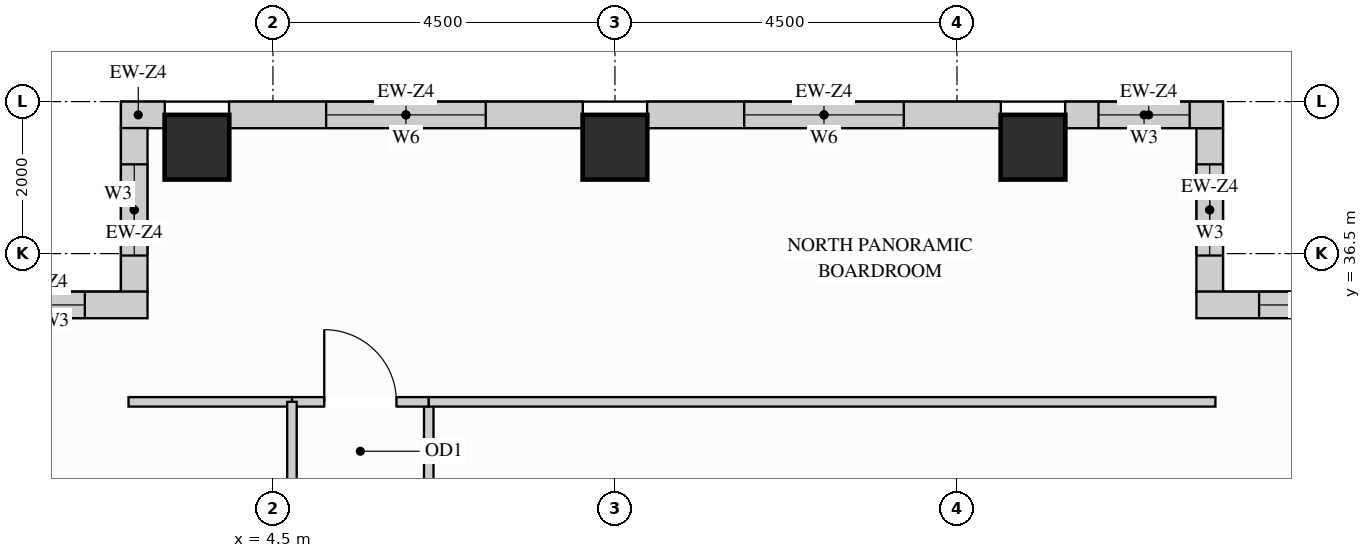
"""IFC4 building model, lengths in metres.
Left out: names, types, materials, properties, quantities, classifications, styles, units other than length and angle.
Written with IfcOpenShell. Run it as: python <this file> out.ifc"""

import sys

from ifc_helpers import new_model, si_unit, direction, frame, frame_2d, origin, origin_2d, place, context, subcontext, project, spatial, rectangle, extrude, source, transform, mapped, element, fill, save


model = new_model("IFC4")
c1 = context("Model", 3, precision=1e-05, world=origin(), true_north=direction((0.0, 1.0)))
c2 = subcontext(c1, "Body", "Model", "MODEL_VIEW")
j1 = project(units=[si_unit("LENGTHUNIT", "METRE"), si_unit("PLANEANGLEUNIT", "RADIAN")], contexts=[c1])
p1 = place(None, origin())
s1 = spatial("IfcSite", under=j1, at=p1, CompositionType="ELEMENT")
p2 = place(p1, origin())
s2 = spatial("IfcBuilding", under=s1, at=p2, CompositionType="ELEMENT")
p3 = place(p2, frame((0.0, 0.0, 270.0)))
s3 = spatial("IfcBuildingStorey", under=s2, at=p3, CompositionType="ELEMENT", Elevation=270.0)
m1 = source(origin(), c2, "Body", "SweptSolid", [
    extrude(rectangle(XDim=0.85, YDim=0.85, at=origin_2d()), origin(), (0.0, 0.0, 1.0), 3.4),
])
for number, where, z_axis, x_axis in (
    (1, (14.5, 37.9, 0.0), (0.0, 0.0, 1.0), (1.0, 0.0, 0.0)),
    (2, (3.5, 37.9, 0.0), (0.0, 0.0, 1.0), (1.0, 0.0, 0.0)),
    (3, (9.0, 37.9, 0.0), (0.0, 0.0, 1.0), (1.0, 0.0, 0.0)),
):
    element("IfcColumn", number, at=place(p3, frame(where, z_axis=z_axis, x_axis=x_axis)), inside=s3, PredefinedType="COLUMN", context=c2, shape_type="MappedRepresentation", body=[
        mapped(m1, transform((0.0, 0.0, 0.0), x_axis=(1.0, 0.0, 0.0), y_axis=(0.0, 1.0, 0.0), z_axis=(0.0, 0.0, 1.0))),
    ])
p4 = place(p3, frame((16.825, 35.998, 0.0), z_axis=(0.0, 0.0, 1.0), x_axis=(0.0, 1.0, 0.0)))
e4 = element("IfcWall", 4, at=p4, inside=s3, PredefinedType="SOLIDWALL", context=c2, shape_type="SweptSolid", body=[
    extrude(rectangle(XDim=2.154, YDim=0.35, at=frame_2d((1.077, 0.0))), origin(), (0.0, 0.0, 1.0), 3.385),
])
p5 = place(p4, frame((0.477, 0.0, 0.78)))
e5 = element("IfcOpeningElement", 5, at=p5, cuts=e4, PredefinedType="OPENING", context=c2, shape_type="SweptSolid", body=[
    extrude(rectangle(XDim=1.2, YDim=2.25, at=frame_2d((0.6, 1.125))), frame((0.0, 0.185, 0.0), z_axis=(0.0, -1.0, 0.0), x_axis=(1.0, 0.0, 0.0)), (0.0, 0.0, 1.0), 0.37),
])
p6 = place(p3, frame((17.0, 38.325, 0.0), z_axis=(0.0, 0.0, 1.0), x_axis=(-1.0, 0.0, 0.0)))
e6 = element("IfcWall", 6, at=p6, inside=s3, PredefinedType="SOLIDWALL", context=c2, shape_type="SweptSolid", body=[
    extrude(rectangle(XDim=2.077, YDim=0.35, at=frame_2d((1.039, 0.0))), origin(), (0.0, 0.0, 1.0), 3.385),
])
p7 = place(p6, frame((0.438, 0.0, 0.78)))
e7 = element("IfcOpeningElement", 7, at=p7, cuts=e6, PredefinedType="OPENING", context=c2, shape_type="SweptSolid", body=[
    extrude(rectangle(XDim=1.2, YDim=2.25, at=frame_2d((0.6, 1.125))), frame((0.0, 0.185, 0.0), z_axis=(0.0, -1.0, 0.0), x_axis=(1.0, 0.0, 0.0)), (0.0, 0.0, 1.0), 0.37),
])
p8 = place(p3, frame((14.077, 38.325, 0.0), z_axis=(0.0, 0.0, 1.0), x_axis=(-1.0, 0.0, 0.0)))
e8 = element("IfcWall", 8, at=p8, inside=s3, PredefinedType="SOLIDWALL", context=c2, shape_type="SweptSolid", body=[
    extrude(rectangle(XDim=4.654, YDim=0.35, at=frame_2d((2.327, 0.0))), origin(), (0.0, 0.0, 1.0), 3.385),
])
p9 = place(p8, frame((1.277, 0.0, 0.78)))
e9 = element("IfcOpeningElement", 9, at=p9, cuts=e8, PredefinedType="OPENING", context=c2, shape_type="SweptSolid", body=[
    extrude(rectangle(XDim=2.1, YDim=2.25, at=frame_2d((1.05, 1.125))), frame((0.0, 0.185, 0.0), z_axis=(0.0, -1.0, 0.0), x_axis=(1.0, 0.0, 0.0)), (0.0, 0.0, 1.0), 0.37),
])
p10 = place(p3, frame((8.577, 38.325, 0.0), z_axis=(0.0, 0.0, 1.0), x_axis=(-1.0, 0.0, 0.0)))
e10 = element("IfcWall", 10, at=p10, inside=s3, PredefinedType="SOLIDWALL", context=c2, shape_type="SweptSolid", body=[
    extrude(rectangle(XDim=4.654, YDim=0.35, at=frame_2d((2.327, 0.0))), origin(), (0.0, 0.0, 1.0), 3.385),
])
p11 = place(p10, frame((1.277, 0.0, 0.78)))
e11 = element("IfcOpeningElement", 11, at=p11, cuts=e10, PredefinedType="OPENING", context=c2, shape_type="SweptSolid", body=[
    extrude(rectangle(XDim=2.1, YDim=2.25, at=frame_2d((1.05, 1.125))), frame((0.0, 0.185, 0.0), z_axis=(0.0, -1.0, 0.0), x_axis=(1.0, 0.0, 0.0)), (0.0, 0.0, 1.0), 0.37),
])
m2 = source(origin(), c2, "Body", "SweptSolid", [
    extrude(rectangle(XDim=0.577, YDim=0.35, at=frame_2d((0.289, 0.0))), origin(), (0.0, 0.0, 1.0), 3.385),
])
p12 = place(p3, frame((3.077, 38.325, 0.0), z_axis=(0.0, 0.0, 1.0), x_axis=(-1.0, 0.0, 0.0)))
e12 = element("IfcWall", 12, at=p12, inside=s3, PredefinedType="SOLIDWALL", context=c2, shape_type="MappedRepresentation", body=[
    mapped(m2, transform((0.0, 0.0, 0.0), x_axis=(1.0, 0.0, 0.0), y_axis=(0.0, 1.0, 0.0), z_axis=(0.0, 0.0, 1.0))),
])
p13 = place(p3, frame((2.675, 38.152, 0.0), z_axis=(0.0, 0.0, 1.0), x_axis=(0.0, -1.0, 0.0)))
e13 = element("IfcWall", 13, at=p13, inside=s3, PredefinedType="SOLIDWALL", context=c2, shape_type="SweptSolid", body=[
    extrude(rectangle(XDim=2.154, YDim=0.35, at=frame_2d((1.077, 0.0))), origin(), (0.0, 0.0, 1.0), 3.385),
])
p14 = place(p13, frame((0.477, 0.0, 0.78)))
e14 = element("IfcOpeningElement", 14, at=p14, cuts=e13, PredefinedType="OPENING", context=c2, shape_type="SweptSolid", body=[
    extrude(rectangle(XDim=1.2, YDim=2.25, at=frame_2d((0.6, 1.125))), frame((0.0, 0.185, 0.0), z_axis=(0.0, -1.0, 0.0), x_axis=(1.0, 0.0, 0.0)), (0.0, 0.0, 1.0), 0.37),
])
p15 = place(p3, frame((2.85, 35.825, 0.0), z_axis=(0.0, 0.0, 1.0), x_axis=(-1.0, 0.0, 0.0)))
e15 = element("IfcWall", 15, at=p15, inside=s3, PredefinedType="SOLIDWALL", context=c2, shape_type="SweptSolid", body=[
    extrude(rectangle(XDim=2.85, YDim=0.35, at=frame_2d((1.425, 0.0))), origin(), (0.0, 0.0, 1.0), 3.385),
])
p16 = place(p15, frame((0.825, 0.0, 0.78)))
e16 = element("IfcOpeningElement", 16, at=p16, cuts=e15, PredefinedType="OPENING", context=c2, shape_type="SweptSolid", body=[
    extrude(rectangle(XDim=1.2, YDim=2.25, at=frame_2d((0.6, 1.125))), frame((0.0, 0.185, 0.0), z_axis=(0.0, -1.0, 0.0), x_axis=(1.0, 0.0, 0.0)), (0.0, 0.0, 1.0), 0.37),
])
p17 = place(p3, frame((19.5, 35.825, 0.0), z_axis=(0.0, 0.0, 1.0), x_axis=(-1.0, 0.0, 0.0)))
e17 = element("IfcWall", 17, at=p17, inside=s3, PredefinedType="SOLIDWALL", context=c2, shape_type="SweptSolid", body=[
    extrude(rectangle(XDim=2.85, YDim=0.35, at=frame_2d((1.425, 0.0))), origin(), (0.0, 0.0, 1.0), 3.385),
])
p18 = place(p17, frame((0.825, 0.0, 0.78)))
e18 = element("IfcOpeningElement", 18, at=p18, cuts=e17, PredefinedType="OPENING", context=c2, shape_type="SweptSolid", body=[
    extrude(rectangle(XDim=1.2, YDim=2.25, at=frame_2d((0.6, 1.125))), frame((0.0, 0.185, 0.0), z_axis=(0.0, -1.0, 0.0), x_axis=(1.0, 0.0, 0.0)), (0.0, 0.0, 1.0), 0.37),
])
p19 = place(p3, frame((6.55, 31.45, 0.0), z_axis=(0.0, 0.0, 1.0), x_axis=(0.0, 1.0, 0.0)))
e19 = element("IfcWall", 19, at=p19, inside=s3, PredefinedType="PARTITIONING", context=c2, shape_type="SweptSolid", body=[
    extrude(rectangle(XDim=3.1, YDim=0.125, at=frame_2d((1.55, 0.0))), origin(), (0.0, 0.0, 1.0), 3.385),
])
p20 = place(p19, frame((1.075, 0.0, 0.0)))
e20 = element("IfcOpeningElement", 20, at=p20, cuts=e19, PredefinedType="OPENING", context=c2, shape_type="SweptSolid", body=[
    extrude(rectangle(XDim=0.95, YDim=2.15, at=frame_2d((0.475, 1.075))), frame((0.0, 0.073, 0.0), z_axis=(0.0, -1.0, 0.0), x_axis=(1.0, 0.0, 0.0)), (0.0, 0.0, 1.0), 0.145),
])
p21 = place(p3, frame((4.75, 34.55, 0.0), z_axis=(0.0, 0.0, 1.0), x_axis=(1.0, 0.0, 0.0)))
e21 = element("IfcWall", 21, at=p21, inside=s3, PredefinedType="PARTITIONING", context=c2, shape_type="SweptSolid", body=[
    extrude(rectangle(XDim=1.8, YDim=0.125, at=frame_2d((0.9, 0.0))), origin(), (0.0, 0.0, 1.0), 3.385),
])
p22 = place(p21, frame((0.425, 0.0, 0.0)))
e22 = element("IfcOpeningElement", 22, at=p22, cuts=e21, PredefinedType="OPENING", context=c2, shape_type="SweptSolid", body=[
    extrude(rectangle(XDim=0.95, YDim=2.15, at=frame_2d((0.475, 1.075))), frame((0.0, 0.073, 0.0), z_axis=(0.0, -1.0, 0.0), x_axis=(1.0, 0.0, 0.0)), (0.0, 0.0, 1.0), 0.145),
])
m3 = source(origin(), c2, "Body", "SweptSolid", [
    extrude(rectangle(XDim=10.35, YDim=0.125, at=frame_2d((5.175, 0.0))), origin(), (0.0, 0.0, 1.0), 3.385),
])
p23 = place(p3, frame((6.55, 34.55, 0.0), z_axis=(0.0, 0.0, 1.0), x_axis=(1.0, 0.0, 0.0)))
e23 = element("IfcWall", 23, at=p23, inside=s3, PredefinedType="PARTITIONING", context=c2, shape_type="MappedRepresentation", body=[
    mapped(m3, transform((0.0, 0.0, 0.0), x_axis=(1.0, 0.0, 0.0), y_axis=(0.0, 1.0, 0.0), z_axis=(0.0, 0.0, 1.0))),
])
m4 = source(origin(), c2, "Body", "SweptSolid", [
    extrude(rectangle(XDim=2.15, YDim=0.125, at=frame_2d((1.075, 0.0))), origin(), (0.0, 0.0, 1.0), 3.385),
])
p24 = place(p3, frame((2.6, 34.55, 0.0), z_axis=(0.0, 0.0, 1.0), x_axis=(1.0, 0.0, 0.0)))
e24 = element("IfcWall", 24, at=p24, inside=s3, PredefinedType="PARTITIONING", context=c2, shape_type="MappedRepresentation", body=[
    mapped(m4, transform((0.0, 0.0, 0.0), x_axis=(1.0, 0.0, 0.0), y_axis=(0.0, 1.0, 0.0), z_axis=(0.0, 0.0, 1.0))),
])
p25 = place(p3, frame((4.75, 31.45, 0.0), z_axis=(0.0, 0.0, 1.0), x_axis=(0.0, 1.0, 0.0)))
e25 = element("IfcWall", 25, at=p25, inside=s3, PredefinedType="PARTITIONING", context=c2, shape_type="SweptSolid", body=[
    extrude(rectangle(XDim=3.1, YDim=0.125, at=frame_2d((1.55, 0.0))), origin(), (0.0, 0.0, 1.0), 3.385),
])
p26 = place(p25, frame((1.075, 0.0, 0.0)))
e26 = element("IfcOpeningElement", 26, at=p26, cuts=e25, PredefinedType="OPENING", context=c2, shape_type="SweptSolid", body=[
    extrude(rectangle(XDim=0.95, YDim=2.15, at=frame_2d((0.475, 1.075))), frame((0.0, 0.073, 0.0), z_axis=(0.0, -1.0, 0.0), x_axis=(1.0, 0.0, 0.0)), (0.0, 0.0, 1.0), 0.145),
])
m5 = source(origin(), c2, "Body", "SweptSolid", [
    extrude(rectangle(XDim=0.95, YDim=2.15, at=frame_2d((0.475, 1.075))), frame((0.0, 0.025, 0.0), z_axis=(0.0, -1.0, 0.0), x_axis=(1.0, 0.0, 0.0)), (0.0, 0.0, 1.0), 0.05),
])
p27 = place(p22, origin())
e27 = element("IfcDoor", 27, at=p27, inside=s3, OperationType="SINGLE_SWING_LEFT", PredefinedType="DOOR", context=c2, shape_type="MappedRepresentation", body=[
    mapped(m5, transform((0.0, 0.0, 0.0), x_axis=(1.0, 0.0, 0.0), y_axis=(0.0, 1.0, 0.0), z_axis=(0.0, 0.0, 1.0))),
])
fill(e22, e27)
m6 = source(origin(), c2, "Body", "SweptSolid", [
    extrude(rectangle(XDim=1.2, YDim=2.25, at=frame_2d((0.6, 1.125))), frame((0.0, 0.03, 0.0), z_axis=(0.0, -1.0, 0.0), x_axis=(1.0, 0.0, 0.0)), (0.0, 0.0, 1.0), 0.06),
])
p28 = place(p5, origin())
e28 = element("IfcWindow", 28, at=p28, inside=s3, PartitioningType="SINGLE_PANEL", PredefinedType="WINDOW", context=c2, shape_type="MappedRepresentation", body=[
    mapped(m6, transform((0.0, 0.0, 0.0), x_axis=(1.0, 0.0, 0.0), y_axis=(0.0, 1.0, 0.0), z_axis=(0.0, 0.0, 1.0))),
])
fill(e5, e28)
p29 = place(p7, origin())
e29 = element("IfcWindow", 29, at=p29, inside=s3, PartitioningType="SINGLE_PANEL", PredefinedType="WINDOW", context=c2, shape_type="MappedRepresentation", body=[
    mapped(m6, transform((0.0, 0.0, 0.0), x_axis=(1.0, 0.0, 0.0), y_axis=(0.0, 1.0, 0.0), z_axis=(0.0, 0.0, 1.0))),
])
fill(e7, e29)
p30 = place(p14, origin())
e30 = element("IfcWindow", 30, at=p30, inside=s3, PartitioningType="SINGLE_PANEL", PredefinedType="WINDOW", context=c2, shape_type="MappedRepresentation", body=[
    mapped(m6, transform((0.0, 0.0, 0.0), x_axis=(1.0, 0.0, 0.0), y_axis=(0.0, 1.0, 0.0), z_axis=(0.0, 0.0, 1.0))),
])
fill(e14, e30)
p31 = place(p16, origin())
e31 = element("IfcWindow", 31, at=p31, inside=s3, PartitioningType="SINGLE_PANEL", PredefinedType="WINDOW", context=c2, shape_type="MappedRepresentation", body=[
    mapped(m6, transform((0.0, 0.0, 0.0), x_axis=(1.0, 0.0, 0.0), y_axis=(0.0, 1.0, 0.0), z_axis=(0.0, 0.0, 1.0))),
])
fill(e16, e31)
p32 = place(p18, origin())
e32 = element("IfcWindow", 32, at=p32, inside=s3, PartitioningType="SINGLE_PANEL", PredefinedType="WINDOW", context=c2, shape_type="MappedRepresentation", body=[
    mapped(m6, transform((0.0, 0.0, 0.0), x_axis=(1.0, 0.0, 0.0), y_axis=(0.0, 1.0, 0.0), z_axis=(0.0, 0.0, 1.0))),
])
fill(e18, e32)
m7 = source(origin(), c2, "Body", "SweptSolid", [
    extrude(rectangle(XDim=2.1, YDim=2.25, at=frame_2d((1.05, 1.125))), frame((0.0, 0.03, 0.0), z_axis=(0.0, -1.0, 0.0), x_axis=(1.0, 0.0, 0.0)), (0.0, 0.0, 1.0), 0.06),
])
p33 = place(p9, origin())
e33 = element("IfcWindow", 33, at=p33, inside=s3, PartitioningType="SINGLE_PANEL", PredefinedType="WINDOW", context=c2, shape_type="MappedRepresentation", body=[
    mapped(m7, transform((0.0, 0.0, 0.0), x_axis=(1.0, 0.0, 0.0), y_axis=(0.0, 1.0, 0.0), z_axis=(0.0, 0.0, 1.0))),
])
fill(e9, e33)
p34 = place(p11, origin())
e34 = element("IfcWindow", 34, at=p34, inside=s3, PartitioningType="SINGLE_PANEL", PredefinedType="WINDOW", context=c2, shape_type="MappedRepresentation", body=[
    mapped(m7, transform((0.0, 0.0, 0.0), x_axis=(1.0, 0.0, 0.0), y_axis=(0.0, 1.0, 0.0), z_axis=(0.0, 0.0, 1.0))),
])
fill(e11, e34)
save(model, sys.argv[1])
